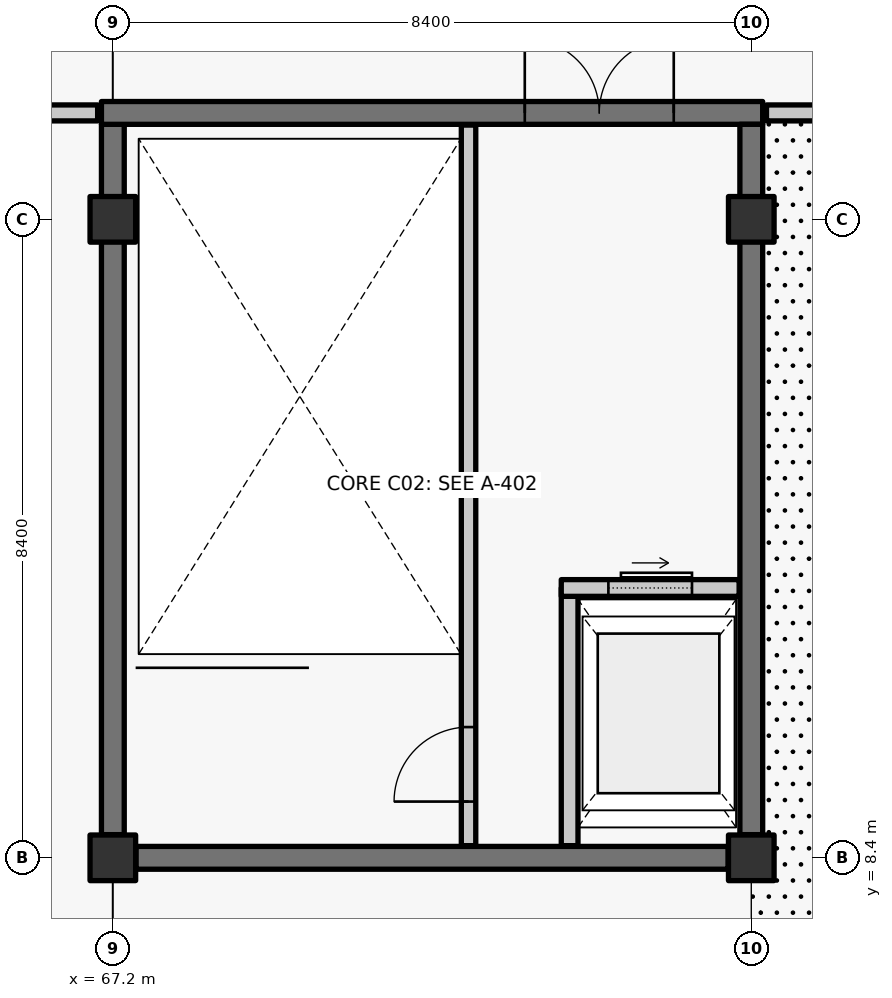
"""IFC4 building model, lengths in metres.
Left out: names, types, materials, properties, quantities, classifications, styles, units other than length and angle.
Written with IfcOpenShell. Run it as: python <this file> out.ifc"""

import sys

from ifc_helpers import new_model, si_unit, direction, frame, frame_2d, origin, origin_2d, place, context, subcontext, project, spatial, rectangle, extrude, element, fill, save


model = new_model("IFC4")
c1 = context("Model", 3, precision=1e-05, world=origin(), true_north=direction((0.0, 1.0)))
c2 = subcontext(c1, "Body", "Model", "MODEL_VIEW")
j1 = project(units=[si_unit("LENGTHUNIT", "METRE"), si_unit("PLANEANGLEUNIT", "RADIAN")], contexts=[c1])
p1 = place(None, origin())
s1 = spatial("IfcSite", under=j1, at=p1, CompositionType="ELEMENT")
p2 = place(p1, origin())
s2 = spatial("IfcBuilding", under=s1, at=p2, CompositionType="ELEMENT")
p3 = place(p2, frame((0.0, 0.0, 16.2)))
s3 = spatial("IfcBuildingStorey", under=s2, at=p3, CompositionType="ELEMENT", Elevation=16.2)
for number, where, z_axis, x_axis in (
    (1, (67.2, 8.4, 0.0), (0.0, 0.0, 1.0), (1.0, 0.0, 0.0)),
    (2, (67.2, 16.8, 0.0), (0.0, 0.0, 1.0), (1.0, 0.0, 0.0)),
    (3, (75.6, 8.4, 0.0), (0.0, 0.0, 1.0), (1.0, 0.0, 0.0)),
    (4, (75.6, 16.8, 0.0), (0.0, 0.0, 1.0), (1.0, 0.0, 0.0)),
):
    element("IfcColumn", number, at=place(p3, frame(where, z_axis=z_axis, x_axis=x_axis)), inside=s3, PredefinedType="COLUMN", context=c2, shape_type="SweptSolid", body=[
        extrude(rectangle(XDim=0.6, YDim=0.6, at=origin_2d()), origin(), (0.0, 0.0, 1.0), 4.26),
    ])
p4 = place(p3, frame((75.295, 8.4, 0.0), z_axis=(0.0, 0.0, 1.0), x_axis=(-1.0, 0.0, 0.0)))
e5 = element("IfcWall", 5, at=p4, inside=s3, PredefinedType="SHEAR", context=c2, shape_type="SweptSolid", body=[
    extrude(rectangle(XDim=7.79, YDim=0.3, at=frame_2d((3.895, 0.0))), origin(), (0.0, 0.0, 1.0), 4.26),
])
p5 = place(p3, frame((67.2, 8.705, 0.0), z_axis=(0.0, 0.0, 1.0), x_axis=(0.0, 1.0, 0.0)))
e6 = element("IfcWall", 6, at=p5, inside=s3, PredefinedType="SHEAR", context=c2, shape_type="SweptSolid", body=[
    extrude(rectangle(XDim=9.345, YDim=0.3, at=frame_2d((4.672, 0.0))), origin(), (0.0, 0.0, 1.0), 4.26),
])
p6 = place(p3, frame((67.05, 18.2, 0.0), z_axis=(0.0, 0.0, 1.0), x_axis=(1.0, 0.0, 0.0)))
e7 = element("IfcWall", 7, at=p6, inside=s3, PredefinedType="SHEAR", context=c2, shape_type="SweptSolid", body=[
    extrude(rectangle(XDim=8.7, YDim=0.3, at=frame_2d((4.35, 0.0))), origin(), (0.0, 0.0, 1.0), 4.26),
])
p7 = place(p6, frame((5.57, 0.0, 0.0)))
e8 = element("IfcOpeningElement", 8, at=p7, cuts=e7, PredefinedType="OPENING", context=c2, shape_type="SweptSolid", body=[
    extrude(rectangle(XDim=1.96, YDim=2.2, at=frame_2d((0.98, 1.1))), frame((0.0, 0.16, 0.0), z_axis=(0.0, -1.0, 0.0), x_axis=(1.0, 0.0, 0.0)), (0.0, 0.0, 1.0), 0.32),
])
p8 = place(p3, frame((75.6, 18.05, 0.0), z_axis=(0.0, 0.0, 1.0), x_axis=(0.0, -1.0, 0.0)))
e9 = element("IfcWall", 9, at=p8, inside=s3, PredefinedType="SHEAR", context=c2, shape_type="SweptSolid", body=[
    extrude(rectangle(XDim=9.345, YDim=0.3, at=frame_2d((4.672, 0.0))), origin(), (0.0, 0.0, 1.0), 4.26),
])
p9 = place(p3, frame((71.88, 8.56, 0.0), z_axis=(0.0, 0.0, 1.0), x_axis=(0.0, 1.0, 0.0)))
e10 = element("IfcWall", 10, at=p9, inside=s3, PredefinedType="SOLIDWALL", context=c2, shape_type="SweptSolid", body=[
    extrude(rectangle(XDim=9.48, YDim=0.19, at=frame_2d((4.74, 0.0))), origin(), (0.0, 0.0, 1.0), 4.26),
])
p10 = place(p9, frame((0.58, 0.0, 0.0)))
e11 = element("IfcOpeningElement", 11, at=p10, cuts=e10, PredefinedType="OPENING", context=c2, shape_type="SweptSolid", body=[
    extrude(rectangle(XDim=0.98, YDim=2.15, at=frame_2d((0.49, 1.075))), frame((0.0, 0.105, 0.0), z_axis=(0.0, -1.0, 0.0), x_axis=(1.0, 0.0, 0.0)), (0.0, 0.0, 1.0), 0.21),
])
p11 = place(p3, frame((73.21, 8.56, 0.0), z_axis=(0.0, 0.0, 1.0), x_axis=(0.0, 1.0, 0.0)))
e12 = element("IfcWall", 12, at=p11, inside=s3, PredefinedType="SOLIDWALL", context=c2, shape_type="SweptSolid", body=[
    extrude(rectangle(XDim=3.39, YDim=0.22, at=frame_2d((1.695, 0.0))), origin(), (0.0, 0.0, 1.0), 4.26),
])
p12 = place(p3, frame((73.1, 11.95, 0.0), z_axis=(0.0, 0.0, 1.0), x_axis=(1.0, 0.0, 0.0)))
e13 = element("IfcWall", 13, at=p12, inside=s3, PredefinedType="SOLIDWALL", context=c2, shape_type="SweptSolid", body=[
    extrude(rectangle(XDim=2.34, YDim=0.22, at=frame_2d((1.17, 0.0))), origin(), (0.0, 0.0, 1.0), 4.26),
])
p13 = place(p12, frame((0.62, 0.0, 0.0)))
e14 = element("IfcOpeningElement", 14, at=p13, cuts=e13, PredefinedType="OPENING", context=c2, shape_type="SweptSolid", body=[
    extrude(rectangle(XDim=1.1, YDim=2.2, at=frame_2d((0.55, 1.1))), frame((0.0, 0.12, 0.0), z_axis=(0.0, -1.0, 0.0), x_axis=(1.0, 0.0, 0.0)), (0.0, 0.0, 1.0), 0.24),
])
p14 = place(p3, frame((33.8, 18.2, 0.0), z_axis=(0.0, 0.0, 1.0), x_axis=(1.0, 0.0, 0.0)))
e15 = element("IfcWall", 15, at=p14, inside=s3, PredefinedType="PARTITIONING", context=c2, shape_type="SweptSolid", body=[
    extrude(rectangle(XDim=33.2, YDim=0.21, at=frame_2d((16.6, 0.0))), origin(), (0.0, 0.0, 1.0), 4.26),
])
p15 = place(p14, frame((3.5, 0.0, 0.0)))
e16 = element("IfcOpeningElement", 16, at=p15, cuts=e15, PredefinedType="OPENING", context=c2, shape_type="SweptSolid", body=[
    extrude(rectangle(XDim=1.0, YDim=2.15, at=frame_2d((0.5, 1.075))), frame((0.0, 0.115, 0.0), z_axis=(0.0, -1.0, 0.0), x_axis=(1.0, 0.0, 0.0)), (0.0, 0.0, 1.0), 0.23),
])
p16 = place(p14, frame((20.3, 0.0, 0.0)))
e17 = element("IfcOpeningElement", 17, at=p16, cuts=e15, PredefinedType="OPENING", context=c2, shape_type="SweptSolid", body=[
    extrude(rectangle(XDim=1.0, YDim=2.15, at=frame_2d((0.5, 1.075))), frame((0.0, 0.115, 0.0), z_axis=(0.0, -1.0, 0.0), x_axis=(1.0, 0.0, 0.0)), (0.0, 0.0, 1.0), 0.23),
])
p17 = place(p3, frame((75.8, 18.2, 0.0), z_axis=(0.0, 0.0, 1.0), x_axis=(1.0, 0.0, 0.0)))
e18 = element("IfcWall", 18, at=p17, inside=s3, PredefinedType="PARTITIONING", context=c2, shape_type="SweptSolid", body=[
    extrude(rectangle(XDim=16.4, YDim=0.21, at=frame_2d((8.2, 0.0))), origin(), (0.0, 0.0, 1.0), 4.26),
])
p18 = place(p17, frame((3.5, 0.0, 0.0)))
e19 = element("IfcOpeningElement", 19, at=p18, cuts=e18, PredefinedType="OPENING", context=c2, shape_type="SweptSolid", body=[
    extrude(rectangle(XDim=1.0, YDim=2.15, at=frame_2d((0.5, 1.075))), frame((0.0, 0.115, 0.0), z_axis=(0.0, -1.0, 0.0), x_axis=(1.0, 0.0, 0.0)), (0.0, 0.0, 1.0), 0.23),
])
p19 = place(p17, frame((11.9, 0.0, 0.0)))
e20 = element("IfcOpeningElement", 20, at=p19, cuts=e18, PredefinedType="OPENING", context=c2, shape_type="SweptSolid", body=[
    extrude(rectangle(XDim=1.0, YDim=2.15, at=frame_2d((0.5, 1.075))), frame((0.0, 0.115, 0.0), z_axis=(0.0, -1.0, 0.0), x_axis=(1.0, 0.0, 0.0)), (0.0, 0.0, 1.0), 0.23),
])
p20 = place(p10, origin())
e21 = element("IfcDoor", 21, at=p20, inside=s3, OperationType="SINGLE_SWING_LEFT", PredefinedType="DOOR", context=c2, shape_type="SweptSolid", body=[
    extrude(rectangle(XDim=0.98, YDim=2.15, at=frame_2d((0.49, 1.075))), frame((0.0, 0.025, 0.0), z_axis=(0.0, -1.0, 0.0), x_axis=(1.0, 0.0, 0.0)), (0.0, 0.0, 1.0), 0.05),
])
fill(e11, e21)
p21 = place(p7, origin())
e22 = element("IfcDoor", 22, at=p21, inside=s3, OperationType="DOUBLE_DOOR_SINGLE_SWING", PredefinedType="DOOR", context=c2, shape_type="SweptSolid", body=[
    extrude(rectangle(XDim=1.96, YDim=2.2, at=frame_2d((0.98, 1.1))), frame((0.0, 0.025, 0.0), z_axis=(0.0, -1.0, 0.0), x_axis=(1.0, 0.0, 0.0)), (0.0, 0.0, 1.0), 0.05),
])
fill(e8, e22)
p22 = place(p13, origin())
e23 = element("IfcDoor", 23, at=p22, inside=s3, OperationType="SLIDING_TO_RIGHT", PredefinedType="DOOR", context=c2, shape_type="SweptSolid", body=[
    extrude(rectangle(XDim=1.1, YDim=2.2, at=frame_2d((0.55, 1.1))), frame((0.0, 0.025, 0.0), z_axis=(0.0, -1.0, 0.0), x_axis=(1.0, 0.0, 0.0)), (0.0, 0.0, 1.0), 0.05),
])
fill(e14, e23)
save(model, sys.argv[1])
